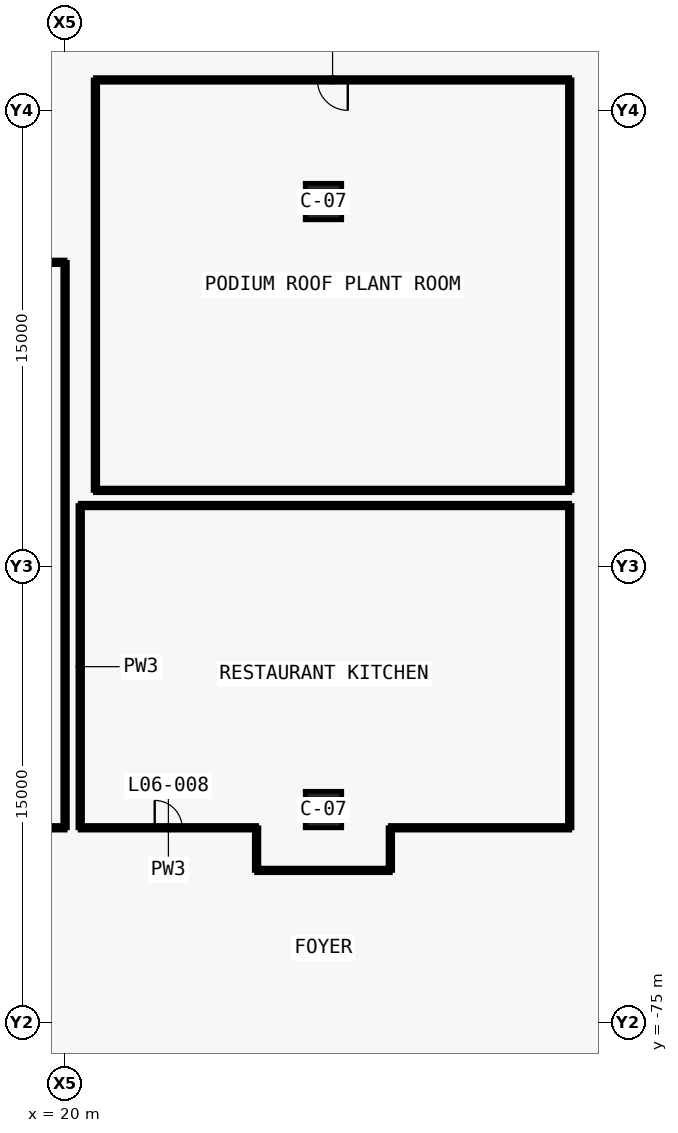
"""IFC4 building model, lengths in metres.
Left out: names, types, materials, properties, quantities, classifications, styles, units other than length and angle.
Written with IfcOpenShell. Run it as: python <this file> out.ifc"""

import sys

from ifc_helpers import new_model, si_unit, direction, frame, frame_2d, origin, origin_2d, place, context, subcontext, project, spatial, rectangle, extrude, element, fill, save


model = new_model("IFC4")
c1 = context("Model", 3, precision=1e-05, world=origin(), true_north=direction((0.0, 1.0)))
c2 = subcontext(c1, "Body", "Model", "MODEL_VIEW")
j1 = project(units=[si_unit("LENGTHUNIT", "METRE"), si_unit("PLANEANGLEUNIT", "RADIAN")], contexts=[c1])
p1 = place(None, origin())
s1 = spatial("IfcSite", under=j1, at=p1, CompositionType="ELEMENT")
p2 = place(p1, origin())
s2 = spatial("IfcBuilding", under=s1, at=p2, CompositionType="ELEMENT")
p3 = place(p2, frame((0.0, 0.0, 43.0)))
s3 = spatial("IfcBuildingStorey", under=s2, at=p3, CompositionType="ELEMENT", Elevation=43.0)
for number, where, z_axis, x_axis in (
    (1, (28.5, -68.0, 0.0), (0.0, 0.0, 1.0), (1.0, 0.0, 0.0)),
    (2, (28.5, -48.0, 0.0), (0.0, 0.0, 1.0), (1.0, 0.0, 0.0)),
):
    element("IfcColumn", number, at=place(p3, frame(where, z_axis=z_axis, x_axis=x_axis)), inside=s3, PredefinedType="COLUMN", context=c2, shape_type="SweptSolid", body=[
        extrude(rectangle(XDim=1.2, YDim=1.2, at=origin_2d()), origin(), (0.0, 0.0, 1.0), 5.5),
    ])
p4 = place(p3, frame((20.001, -68.599, 0.0), z_axis=(0.0, 0.0, 1.0), x_axis=(0.0, 1.0, 0.0)))
e3 = element("IfcWall", 3, at=p4, inside=s3, PredefinedType="PARTITIONING", context=c2, shape_type="SweptSolid", body=[
    extrude(rectangle(XDim=18.599, YDim=0.15, at=frame_2d((9.3, 0.0))), origin(), (0.0, 0.0, 1.0), 4.28),
])
p5 = place(p3, frame((20.0, -49.999, 0.0), z_axis=(0.0, 0.0, 1.0), x_axis=(-1.0, 0.0, 0.0)))
e4 = element("IfcWall", 4, at=p5, inside=s3, PredefinedType="PARTITIONING", context=c2, shape_type="SweptSolid", body=[
    extrude(rectangle(XDim=11.349, YDim=0.15, at=frame_2d((5.675, 0.0))), origin(), (0.0, 0.0, 1.0), 4.28),
])
p6 = place(p3, frame((36.599, -57.999, 0.0), z_axis=(0.0, 0.0, 1.0), x_axis=(-1.0, 0.0, 0.0)))
e5 = element("IfcWall", 5, at=p6, inside=s3, PredefinedType="PARTITIONING", context=c2, shape_type="SweptSolid", body=[
    extrude(rectangle(XDim=16.099, YDim=0.15, at=frame_2d((8.05, 0.0))), origin(), (0.0, 0.0, 1.0), 4.28),
])
p7 = place(p3, frame((20.499, -58.0, 0.0), z_axis=(0.0, 0.0, 1.0), x_axis=(0.0, -1.0, 0.0)))
e6 = element("IfcWall", 6, at=p7, inside=s3, PredefinedType="PARTITIONING", context=c2, shape_type="SweptSolid", body=[
    extrude(rectangle(XDim=10.599, YDim=0.15, at=frame_2d((5.3, 0.0))), origin(), (0.0, 0.0, 1.0), 4.28),
])
p8 = place(p3, frame((36.599, -43.999, 0.0), z_axis=(0.0, 0.0, 1.0), x_axis=(-1.0, 0.0, 0.0)))
e7 = element("IfcWall", 7, at=p8, inside=s3, PredefinedType="PARTITIONING", context=c2, shape_type="SweptSolid", body=[
    extrude(rectangle(XDim=15.599, YDim=0.15, at=frame_2d((7.8, 0.0))), origin(), (0.0, 0.0, 1.0), 4.08),
])
p9 = place(p8, frame((7.3, 0.0, 0.0)))
e8 = element("IfcOpeningElement", 8, at=p9, cuts=e7, PredefinedType="OPENING", context=c2, shape_type="SweptSolid", body=[
    extrude(rectangle(XDim=1.0, YDim=2.1, at=frame_2d((0.5, 1.05))), frame((0.0, 0.085, 0.0), z_axis=(0.0, -1.0, 0.0), x_axis=(1.0, 0.0, 0.0)), (0.0, 0.0, 1.0), 0.17),
])
p10 = place(p3, frame((20.999, -44.0, 0.0), z_axis=(0.0, 0.0, 1.0), x_axis=(0.0, -1.0, 0.0)))
e9 = element("IfcWall", 9, at=p10, inside=s3, PredefinedType="PARTITIONING", context=c2, shape_type="SweptSolid", body=[
    extrude(rectangle(XDim=13.5, YDim=0.15, at=frame_2d((6.75, 0.0))), origin(), (0.0, 0.0, 1.0), 4.28),
])
p11 = place(p3, frame((21.0, -57.501, 0.0), z_axis=(0.0, 0.0, 1.0), x_axis=(1.0, 0.0, 0.0)))
e10 = element("IfcWall", 10, at=p11, inside=s3, PredefinedType="PARTITIONING", context=c2, shape_type="SweptSolid", body=[
    extrude(rectangle(XDim=15.599, YDim=0.15, at=frame_2d((7.8, 0.0))), origin(), (0.0, 0.0, 1.0), 4.28),
])
p12 = place(p3, frame((26.301, -70.001, 0.0), z_axis=(0.0, 0.0, 1.0), x_axis=(1.0, 0.0, 0.0)))
e11 = element("IfcWall", 11, at=p12, inside=s3, PredefinedType="PARTITIONING", context=c2, shape_type="SweptSolid", body=[
    extrude(rectangle(XDim=4.398, YDim=0.15, at=frame_2d((2.199, 0.0))), origin(), (0.0, 0.0, 1.0), 4.28),
])
p13 = place(p3, frame((10.12, -68.6, 0.0), z_axis=(0.0, 0.0, 1.0), x_axis=(1.0, 0.0, 0.0)))
e12 = element("IfcWall", 12, at=p13, inside=s3, PredefinedType="PARTITIONING", context=c2, shape_type="SweptSolid", body=[
    extrude(rectangle(XDim=9.882, YDim=0.15, at=frame_2d((4.941, 0.0))), origin(), (0.0, 0.0, 1.0), 5.1),
])
p14 = place(p3, frame((20.498, -68.6, 0.0), z_axis=(0.0, 0.0, 1.0), x_axis=(1.0, 0.0, 0.0)))
e13 = element("IfcWall", 13, at=p14, inside=s3, PredefinedType="PARTITIONING", context=c2, shape_type="SweptSolid", body=[
    extrude(rectangle(XDim=5.802, YDim=0.15, at=frame_2d((2.901, 0.0))), origin(), (0.0, 0.0, 1.0), 5.1),
])
p15 = place(p14, frame((2.451, 0.0, 0.0)))
e14 = element("IfcOpeningElement", 14, at=p15, cuts=e13, PredefinedType="OPENING", context=c2, shape_type="SweptSolid", body=[
    extrude(rectangle(XDim=0.9, YDim=2.1, at=frame_2d((0.45, 1.05))), frame((0.0, 0.085, 0.0), z_axis=(0.0, -1.0, 0.0), x_axis=(1.0, 0.0, 0.0)), (0.0, 0.0, 1.0), 0.17),
])
for number, where, z_axis, x_axis in (
    (15, (26.3, -68.6, 0.0), (0.0, 0.0, 1.0), (0.0, -1.0, 0.0)),
    (16, (30.7, -70.002, 0.0), (0.0, 0.0, 1.0), (0.0, 1.0, 0.0)),
):
    element("IfcWall", number, at=place(p3, frame(where, z_axis=z_axis, x_axis=x_axis)), inside=s3, PredefinedType="PARTITIONING", context=c2, shape_type="SweptSolid", body=[
        extrude(rectangle(XDim=1.402, YDim=0.15, at=frame_2d((0.701, 0.0))), origin(), (0.0, 0.0, 1.0), 5.1),
    ])
p16 = place(p3, frame((30.7, -68.6, 0.0), z_axis=(0.0, 0.0, 1.0), x_axis=(1.0, 0.0, 0.0)))
e17 = element("IfcWall", 17, at=p16, inside=s3, PredefinedType="PARTITIONING", context=c2, shape_type="SweptSolid", body=[
    extrude(rectangle(XDim=5.9, YDim=0.15, at=frame_2d((2.95, 0.0))), origin(), (0.0, 0.0, 1.0), 5.1),
])
p17 = place(p3, frame((36.6, -68.6, 0.0), z_axis=(0.0, 0.0, 1.0), x_axis=(0.0, 1.0, 0.0)))
e18 = element("IfcWall", 18, at=p17, inside=s3, PredefinedType="PARTITIONING", context=c2, shape_type="SweptSolid", body=[
    extrude(rectangle(XDim=10.602, YDim=0.15, at=frame_2d((5.301, 0.0))), origin(), (0.0, 0.0, 1.0), 4.28),
])
p18 = place(p3, frame((36.6, -57.502, 0.0), z_axis=(0.0, 0.0, 1.0), x_axis=(0.0, 1.0, 0.0)))
e19 = element("IfcWall", 19, at=p18, inside=s3, PredefinedType="PARTITIONING", context=c2, shape_type="SweptSolid", body=[
    extrude(rectangle(XDim=13.503, YDim=0.15, at=frame_2d((6.752, 0.0))), origin(), (0.0, 0.0, 1.0), 4.28),
])
p19 = place(p15, origin())
e20 = element("IfcDoor", 20, at=p19, inside=s3, OperationType="SINGLE_SWING_LEFT", PredefinedType="DOOR", context=c2, shape_type="SweptSolid", body=[
    extrude(rectangle(XDim=0.9, YDim=2.1, at=frame_2d((0.45, 1.05))), frame((0.0, 0.025, 0.0), z_axis=(0.0, -1.0, 0.0), x_axis=(1.0, 0.0, 0.0)), (0.0, 0.0, 1.0), 0.05),
])
fill(e14, e20)
p20 = place(p9, origin())
e21 = element("IfcDoor", 21, at=p20, inside=s3, OperationType="SINGLE_SWING_RIGHT", PredefinedType="DOOR", context=c2, shape_type="SweptSolid", body=[
    extrude(rectangle(XDim=1.0, YDim=2.1, at=frame_2d((0.5, 1.05))), frame((0.0, 0.025, 0.0), z_axis=(0.0, -1.0, 0.0), x_axis=(1.0, 0.0, 0.0)), (0.0, 0.0, 1.0), 0.05),
])
fill(e8, e21)
save(model, sys.argv[1])
